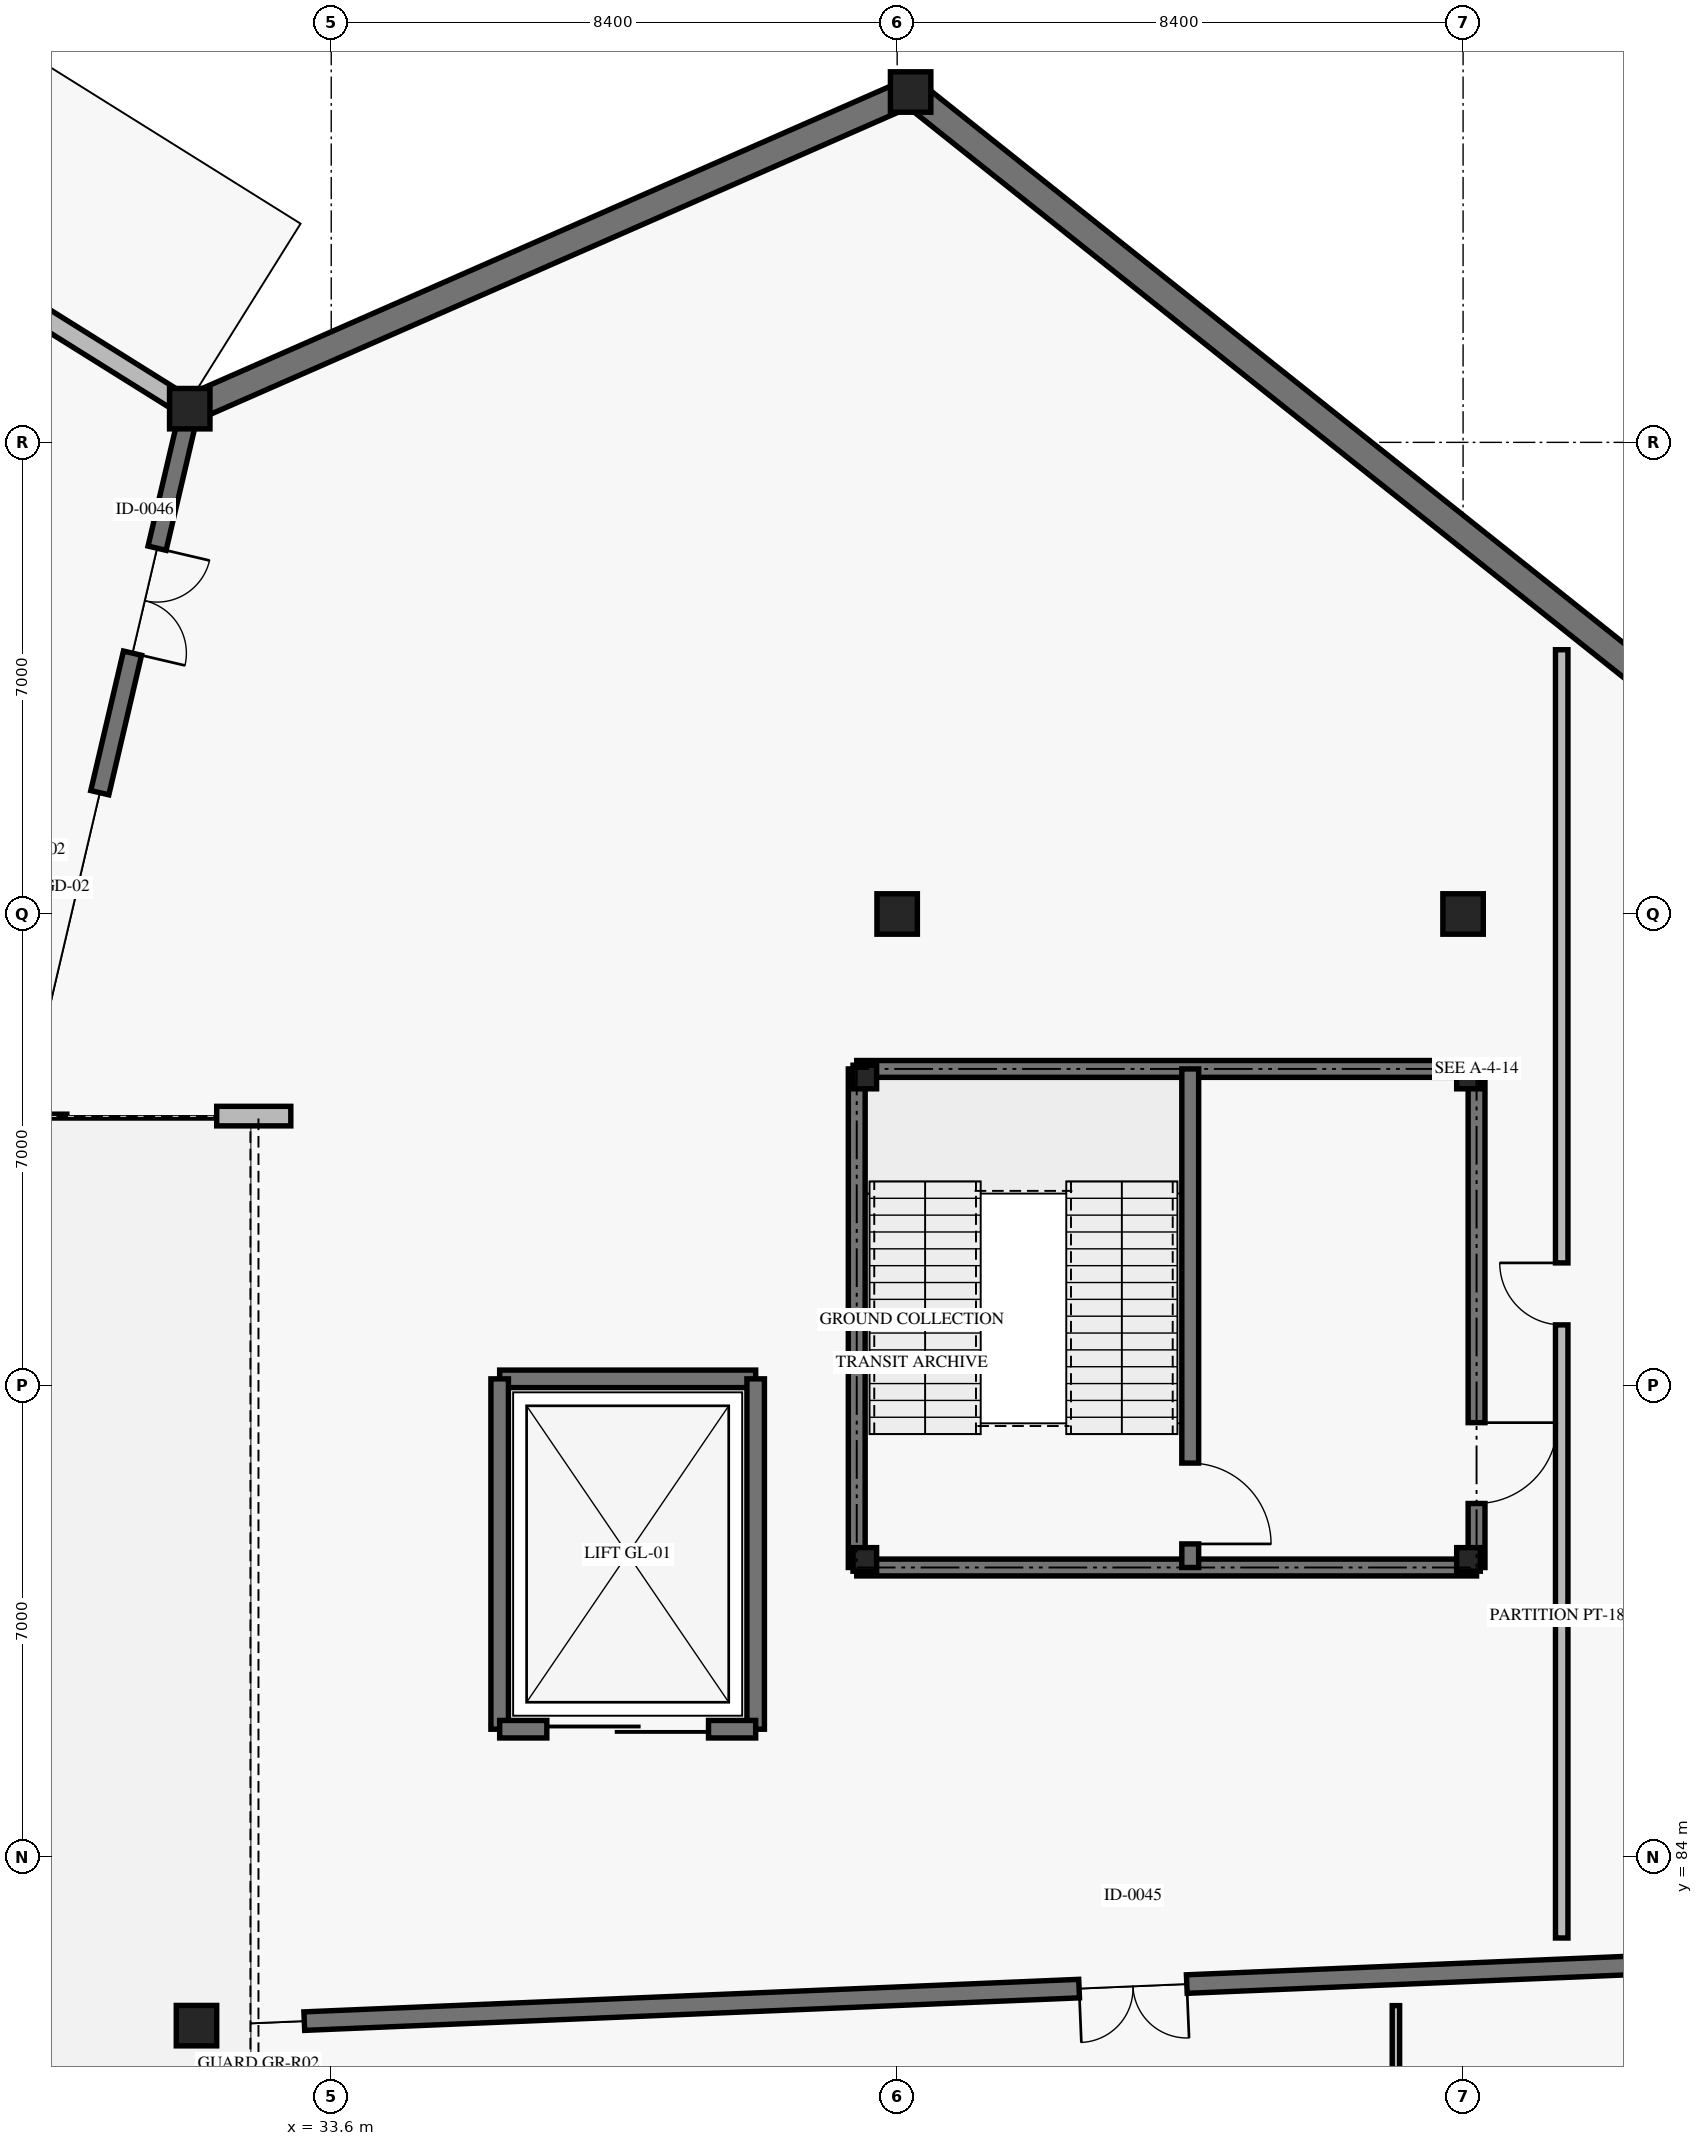
"""IFC4 building model, lengths in metres.
Left out: names, types, materials, properties, quantities, classifications, styles, units other than length and angle.
Written with IfcOpenShell. Run it as: python <this file> out.ifc"""

import sys

from ifc_helpers import new_model, si_unit, direction, frame, frame_2d, origin, origin_2d, place, context, subcontext, project, spatial, rectangle, i_section, extrude, element, fill, save


model = new_model("IFC4")
c1 = context("Model", 3, precision=1e-05, world=origin(), true_north=direction((0.0, 1.0)))
c2 = subcontext(c1, "Body", "Model", "MODEL_VIEW")
j1 = project(units=[si_unit("LENGTHUNIT", "METRE"), si_unit("PLANEANGLEUNIT", "RADIAN")], contexts=[c1])
p1 = place(None, origin())
s1 = spatial("IfcSite", under=j1, at=p1, CompositionType="ELEMENT")
p2 = place(p1, origin())
s2 = spatial("IfcBuilding", under=s1, at=p2, CompositionType="ELEMENT")
p3 = place(p2, origin())
s3 = spatial("IfcBuildingStorey", under=s2, at=p3, CompositionType="ELEMENT", Elevation=0.0)
for number, where, z_axis, x_axis in (
    (1, (31.5, 105.5, 0.0), (0.0, 0.0, 1.0), (1.0, 0.0, 0.0)),
    (2, (31.6, 81.5, 0.0), (0.0, 0.0, 1.0), (1.0, 0.0, 0.0)),
    (3, (42.2, 110.2, 0.0), (0.0, 0.0, 1.0), (1.0, 0.0, 0.0)),
    (4, (42.0, 98.0, 0.0), (0.0, 0.0, 1.0), (1.0, 0.0, 0.0)),
    (5, (50.4, 98.0, 0.0), (0.0, 0.0, 1.0), (1.0, 0.0, 0.0)),
):
    element("IfcColumn", number, at=place(p3, frame(where, z_axis=z_axis, x_axis=x_axis)), inside=s3, PredefinedType="COLUMN", context=c2, shape_type="SweptSolid", body=[
        extrude(rectangle(XDim=0.6, YDim=0.6, at=origin_2d()), origin(), (0.0, 0.0, 1.0), 5.4),
    ])
for number, where, z_axis, x_axis in (
    (6, (41.52, 88.42, 0.0), (0.0, 0.0, 1.0), (1.0, 0.0, 0.0)),
    (7, (50.48, 88.42, 0.0), (0.0, 0.0, 1.0), (1.0, 0.0, 0.0)),
    (8, (50.48, 95.58, 0.0), (0.0, 0.0, 1.0), (1.0, 0.0, 0.0)),
    (9, (41.52, 95.58, 0.0), (0.0, 0.0, 1.0), (1.0, 0.0, 0.0)),
):
    element("IfcColumn", number, at=place(p3, frame(where, z_axis=z_axis, x_axis=x_axis)), inside=s3, PredefinedType="COLUMN", context=c2, shape_type="SweptSolid", body=[
        extrude(i_section(OverallWidth=0.35, OverallDepth=0.35, WebThickness=0.02, FlangeThickness=0.028, at=origin_2d()), origin(), (0.0, 0.0, 1.0), 5.4),
    ])
p4 = place(p3, frame((42.2, 110.2, 0.0), z_axis=(0.0, 0.0, 1.0), x_axis=(0.78200261515, -0.623275147827, 0.0)))
e10 = element("IfcWall", 10, at=p4, inside=s3, PredefinedType="SOLIDWALL", context=c2, shape_type="SweptSolid", body=[
    extrude(rectangle(XDim=25.831, YDim=0.4, at=frame_2d((12.916, 0.0))), origin(), (0.0, 0.0, 1.0), 4.22),
])
p5 = place(p3, frame((31.555, 105.524, 0.0), z_axis=(0.0, 0.0, 1.0), x_axis=(0.915561631163, 0.402177696474, 0.0)))
e11 = element("IfcWall", 11, at=p5, inside=s3, PredefinedType="SOLIDWALL", context=c2, shape_type="SweptSolid", body=[
    extrude(rectangle(XDim=11.627, YDim=0.4, at=frame_2d((5.813, 0.0))), origin(), (0.0, 0.0, 1.0), 4.22),
])
p6 = place(p3, frame((21.1, 112.0, 0.0), z_axis=(0.0, 0.0, 1.0), x_axis=(0.84799942789, -0.529997141784, 0.0)))
e12 = element("IfcWall", 12, at=p6, inside=s3, PredefinedType="SOLIDWALL", context=c2, shape_type="SweptSolid", body=[
    extrude(rectangle(XDim=12.204, YDim=0.29, at=frame_2d((6.102, 0.0))), origin(), (0.0, 0.0, 1.0), 4.22),
])
p7 = place(p6, frame((4.002, 0.0, 0.0)))
e13 = element("IfcOpeningElement", 13, at=p7, cuts=e12, PredefinedType="OPENING", context=c2, shape_type="SweptSolid", body=[
    extrude(rectangle(XDim=4.2, YDim=3.92, at=frame_2d((2.1, 1.96))), frame((0.0, 0.155, 0.0), z_axis=(0.0, -1.0, 0.0), x_axis=(1.0, 0.0, 0.0)), (0.0, 0.0, 1.0), 0.31),
])
p8 = place(p3, frame((33.0, 95.0, 0.0), z_axis=(0.0, 0.0, 1.0), x_axis=(-1.0, 0.0, 0.0)))
e14 = element("IfcWall", 14, at=p8, inside=s3, PredefinedType="SOLIDWALL", context=c2, shape_type="SweptSolid", body=[
    extrude(rectangle(XDim=7.6, YDim=0.29, at=frame_2d((3.8, 0.0))), origin(), (0.0, 0.0, 1.0), 3.8),
])
p9 = place(p8, frame((1.1, 0.0, 0.0)))
e15 = element("IfcOpeningElement", 15, at=p9, cuts=e14, PredefinedType="OPENING", context=c2, shape_type="SweptSolid", body=[
    extrude(rectangle(XDim=5.2, YDim=2.8, at=frame_2d((2.6, 1.4))), frame((0.0, 0.155, 0.0), z_axis=(0.0, -1.0, 0.0), x_axis=(1.0, 0.0, 0.0)), (0.0, 0.0, 1.0), 0.31),
])
p10 = place(p3, frame((57.8, 82.6, 0.0), z_axis=(0.0, 0.0, 1.0), x_axis=(-0.999119166836, -0.041962965345, 0.0)))
e16 = element("IfcWall", 16, at=p10, inside=s3, PredefinedType="SOLIDWALL", context=c2, shape_type="SweptSolid", body=[
    extrude(rectangle(XDim=24.622, YDim=0.275, at=frame_2d((12.311, 0.0))), origin(), (0.0, 0.0, 1.0), 4.62),
])
p11 = place(p10, frame((11.511, 0.0, 0.0)))
e17 = element("IfcOpeningElement", 17, at=p11, cuts=e16, PredefinedType="OPENING", context=c2, shape_type="SweptSolid", body=[
    extrude(rectangle(XDim=1.6, YDim=2.45, at=frame_2d((0.8, 1.225))), frame((0.0, 0.147, 0.0), z_axis=(0.0, -1.0, 0.0), x_axis=(1.0, 0.0, 0.0)), (0.0, 0.0, 1.0), 0.295),
])
p12 = place(p3, frame((31.5, 105.5, 0.0), z_axis=(0.0, 0.0, 1.0), x_axis=(-0.228035044918, -0.973652924963, 0.0)))
e18 = element("IfcWall", 18, at=p12, inside=s3, PredefinedType="SOLIDWALL", context=c2, shape_type="SweptSolid", body=[
    extrude(rectangle(XDim=5.854, YDim=0.275, at=frame_2d((2.927, 0.0))), origin(), (0.0, 0.0, 1.0), 4.62),
])
p13 = place(p12, frame((2.127, 0.0, 0.0)))
e19 = element("IfcOpeningElement", 19, at=p13, cuts=e18, PredefinedType="OPENING", context=c2, shape_type="SweptSolid", body=[
    extrude(rectangle(XDim=1.6, YDim=2.45, at=frame_2d((0.8, 1.225))), frame((0.0, 0.147, 0.0), z_axis=(0.0, -1.0, 0.0), x_axis=(1.0, 0.0, 0.0)), (0.0, 0.0, 1.0), 0.295),
])
p14 = place(p3, frame((49.403, 57.267, 0.0), z_axis=(0.0, 0.0, 1.0), x_axis=(0.0, 1.0, 0.0)))
e20 = element("IfcWall", 20, at=p14, inside=s3, PredefinedType="PARTITIONING", context=c2, shape_type="SweptSolid", body=[
    extrude(rectangle(XDim=24.53, YDim=0.11, at=frame_2d((12.265, 0.0))), origin(), (0.0, 0.0, 1.0), 3.92),
])
p15 = place(p14, frame((11.79, 0.0, 0.0)))
e21 = element("IfcOpeningElement", 21, at=p15, cuts=e20, PredefinedType="OPENING", context=c2, shape_type="SweptSolid", body=[
    extrude(rectangle(XDim=0.95, YDim=2.15, at=frame_2d((0.475, 1.075))), frame((0.0, 0.065, 0.0), z_axis=(0.0, -1.0, 0.0), x_axis=(1.0, 0.0, 0.0)), (0.0, 0.0, 1.0), 0.13),
])
p16 = place(p3, frame((51.864, 82.801, 0.0), z_axis=(0.0, 0.0, 1.0), x_axis=(0.0, 1.0, 0.0)))
e22 = element("IfcWall", 22, at=p16, inside=s3, PredefinedType="PARTITIONING", context=c2, shape_type="SweptSolid", body=[
    extrude(rectangle(XDim=19.121, YDim=0.185, at=frame_2d((9.561, 0.0))), origin(), (0.0, 0.0, 1.0), 3.92),
])
p17 = place(p16, frame((9.1, 0.0, 0.0)))
e23 = element("IfcOpeningElement", 23, at=p17, cuts=e22, PredefinedType="OPENING", context=c2, shape_type="SweptSolid", body=[
    extrude(rectangle(XDim=0.92, YDim=2.1, at=frame_2d((0.46, 1.05))), frame((0.0, 0.103, 0.0), z_axis=(0.0, -1.0, 0.0), x_axis=(1.0, 0.0, 0.0)), (0.0, 0.0, 1.0), 0.205),
])
p18 = place(p3, frame((41.4, 88.3, 0.0), z_axis=(0.0, 0.0, 1.0), x_axis=(0.0, 1.0, 0.0)))
e24 = element("IfcWall", 24, at=p18, inside=s3, PredefinedType="SHEAR", context=c2, shape_type="SweptSolid", body=[
    extrude(rectangle(XDim=7.4, YDim=0.25, at=frame_2d((3.7, 0.0))), origin(), (0.0, 0.0, 1.0), 5.16),
])
for number, where, z_axis, x_axis in (
    (25, (41.4, 95.7, 0.0), (0.0, 0.0, 1.0), (1.0, 0.0, 0.0)),
    (26, (50.6, 88.3, 0.0), (0.0, 0.0, 1.0), (-1.0, 0.0, 0.0)),
):
    element("IfcWall", number, at=place(p3, frame(where, z_axis=z_axis, x_axis=x_axis)), inside=s3, PredefinedType="SHEAR", context=c2, shape_type="SweptSolid", body=[
        extrude(rectangle(XDim=9.2, YDim=0.25, at=frame_2d((4.6, 0.0))), origin(), (0.0, 0.0, 1.0), 5.16),
    ])
p19 = place(p3, frame((50.6, 95.7, 0.0), z_axis=(0.0, 0.0, 1.0), x_axis=(0.0, -1.0, 0.0)))
e27 = element("IfcWall", 27, at=p19, inside=s3, PredefinedType="SHEAR", context=c2, shape_type="SweptSolid", body=[
    extrude(rectangle(XDim=7.4, YDim=0.25, at=frame_2d((3.7, 0.0))), origin(), (0.0, 0.0, 1.0), 5.16),
])
p20 = place(p19, frame((5.25, 0.0, 0.0)))
e28 = element("IfcOpeningElement", 28, at=p20, cuts=e27, PredefinedType="OPENING", context=c2, shape_type="SweptSolid", body=[
    extrude(rectangle(XDim=1.2, YDim=2.2, at=frame_2d((0.6, 1.1))), frame((0.0, 0.135, 0.0), z_axis=(0.0, -1.0, 0.0), x_axis=(1.0, 0.0, 0.0)), (0.0, 0.0, 1.0), 0.27),
])
p21 = place(p3, frame((46.35, 95.7, 0.0), z_axis=(0.0, 0.0, 1.0), x_axis=(0.0, -1.0, 0.0)))
e29 = element("IfcWall", 29, at=p21, inside=s3, PredefinedType="SHEAR", context=c2, shape_type="SweptSolid", body=[
    extrude(rectangle(XDim=7.4, YDim=0.25, at=frame_2d((3.7, 0.0))), origin(), (0.0, 0.0, 1.0), 5.16),
])
p22 = place(p21, frame((5.85, 0.0, 0.0)))
e30 = element("IfcOpeningElement", 30, at=p22, cuts=e29, PredefinedType="OPENING", context=c2, shape_type="SweptSolid", body=[
    extrude(rectangle(XDim=1.2, YDim=2.2, at=frame_2d((0.6, 1.1))), frame((0.0, 0.135, 0.0), z_axis=(0.0, -1.0, 0.0), x_axis=(1.0, 0.0, 0.0)), (0.0, 0.0, 1.0), 0.27),
])
p23 = place(p3, frame((36.1, 91.1, 0.0), z_axis=(0.0, 0.0, 1.0), x_axis=(1.0, 0.0, 0.0)))
e31 = element("IfcWall", 31, at=p23, inside=s3, PredefinedType="SHEAR", context=c2, shape_type="SweptSolid", body=[
    extrude(rectangle(XDim=3.8, YDim=0.26, at=frame_2d((1.9, 0.0))), origin(), (0.0, 0.0, 1.0), 5.16),
])
for number, where, z_axis, x_axis in (
    (32, (39.9, 91.1, 0.0), (0.0, 0.0, 1.0), (0.0, -1.0, 0.0)),
    (33, (36.1, 85.9, 0.0), (0.0, 0.0, 1.0), (0.0, 1.0, 0.0)),
):
    element("IfcWall", number, at=place(p3, frame(where, z_axis=z_axis, x_axis=x_axis)), inside=s3, PredefinedType="SHEAR", context=c2, shape_type="SweptSolid", body=[
        extrude(rectangle(XDim=5.2, YDim=0.26, at=frame_2d((2.6, 0.0))), origin(), (0.0, 0.0, 1.0), 5.16),
    ])
p24 = place(p3, frame((39.9, 85.9, 0.0), z_axis=(0.0, 0.0, 1.0), x_axis=(-1.0, 0.0, 0.0)))
e34 = element("IfcWall", 34, at=p24, inside=s3, PredefinedType="SHEAR", context=c2, shape_type="SweptSolid", body=[
    extrude(rectangle(XDim=3.8, YDim=0.26, at=frame_2d((1.9, 0.0))), origin(), (0.0, 0.0, 1.0), 5.16),
])
p25 = place(p24, frame((0.7, 0.0, 0.0)))
e35 = element("IfcOpeningElement", 35, at=p25, cuts=e34, PredefinedType="OPENING", context=c2, shape_type="SweptSolid", body=[
    extrude(rectangle(XDim=2.4, YDim=2.85, at=frame_2d((1.2, 1.425))), frame((0.0, 0.14, 0.0), z_axis=(0.0, -1.0, 0.0), x_axis=(1.0, 0.0, 0.0)), (0.0, 0.0, 1.0), 0.28),
])
p26 = place(p9, origin())
e36 = element("IfcDoor", 36, at=p26, inside=s3, OperationType="ROLLINGUP", PredefinedType="GATE", context=c2, shape_type="SweptSolid", body=[
    extrude(rectangle(XDim=5.2, YDim=2.8, at=frame_2d((2.6, 1.4))), frame((0.0, 0.025, 0.0), z_axis=(0.0, -1.0, 0.0), x_axis=(1.0, 0.0, 0.0)), (0.0, 0.0, 1.0), 0.05),
])
fill(e15, e36)
p27 = place(p11, origin())
e37 = element("IfcDoor", 37, at=p27, inside=s3, OperationType="DOUBLE_DOOR_SINGLE_SWING", PredefinedType="DOOR", context=c2, shape_type="SweptSolid", body=[
    extrude(rectangle(XDim=1.6, YDim=2.45, at=frame_2d((0.8, 1.225))), frame((0.0, 0.025, 0.0), z_axis=(0.0, -1.0, 0.0), x_axis=(1.0, 0.0, 0.0)), (0.0, 0.0, 1.0), 0.05),
])
fill(e17, e37)
p28 = place(p13, origin())
e38 = element("IfcDoor", 38, at=p28, inside=s3, OperationType="DOUBLE_DOOR_SINGLE_SWING", PredefinedType="DOOR", context=c2, shape_type="SweptSolid", body=[
    extrude(rectangle(XDim=1.6, YDim=2.45, at=frame_2d((0.8, 1.225))), frame((0.0, 0.025, 0.0), z_axis=(0.0, -1.0, 0.0), x_axis=(1.0, 0.0, 0.0)), (0.0, 0.0, 1.0), 0.05),
])
fill(e19, e38)
p29 = place(p17, origin())
e39 = element("IfcDoor", 39, at=p29, inside=s3, OperationType="SINGLE_SWING_RIGHT", PredefinedType="DOOR", context=c2, shape_type="SweptSolid", body=[
    extrude(rectangle(XDim=0.92, YDim=2.1, at=frame_2d((0.46, 1.05))), frame((0.0, 0.025, 0.0), z_axis=(0.0, -1.0, 0.0), x_axis=(1.0, 0.0, 0.0)), (0.0, 0.0, 1.0), 0.05),
])
fill(e23, e39)
p30 = place(p20, origin())
e40 = element("IfcDoor", 40, at=p30, inside=s3, OperationType="SINGLE_SWING_LEFT", PredefinedType="DOOR", context=c2, shape_type="SweptSolid", body=[
    extrude(rectangle(XDim=1.2, YDim=2.2, at=frame_2d((0.6, 1.1))), frame((0.0, 0.025, 0.0), z_axis=(0.0, -1.0, 0.0), x_axis=(1.0, 0.0, 0.0)), (0.0, 0.0, 1.0), 0.05),
])
fill(e28, e40)
p31 = place(p22, origin())
e41 = element("IfcDoor", 41, at=p31, inside=s3, OperationType="SINGLE_SWING_RIGHT", PredefinedType="DOOR", context=c2, shape_type="SweptSolid", body=[
    extrude(rectangle(XDim=1.2, YDim=2.2, at=frame_2d((0.6, 1.1))), frame((0.0, 0.025, 0.0), z_axis=(0.0, -1.0, 0.0), x_axis=(1.0, 0.0, 0.0)), (0.0, 0.0, 1.0), 0.05),
])
fill(e30, e41)
p32 = place(p25, origin())
e42 = element("IfcDoor", 42, at=p32, inside=s3, OperationType="SLIDING_TO_LEFT", PredefinedType="DOOR", context=c2, shape_type="SweptSolid", body=[
    extrude(rectangle(XDim=2.4, YDim=2.85, at=frame_2d((1.2, 1.425))), frame((0.0, 0.025, 0.0), z_axis=(0.0, -1.0, 0.0), x_axis=(1.0, 0.0, 0.0)), (0.0, 0.0, 1.0), 0.05),
])
fill(e35, e42)
save(model, sys.argv[1])
